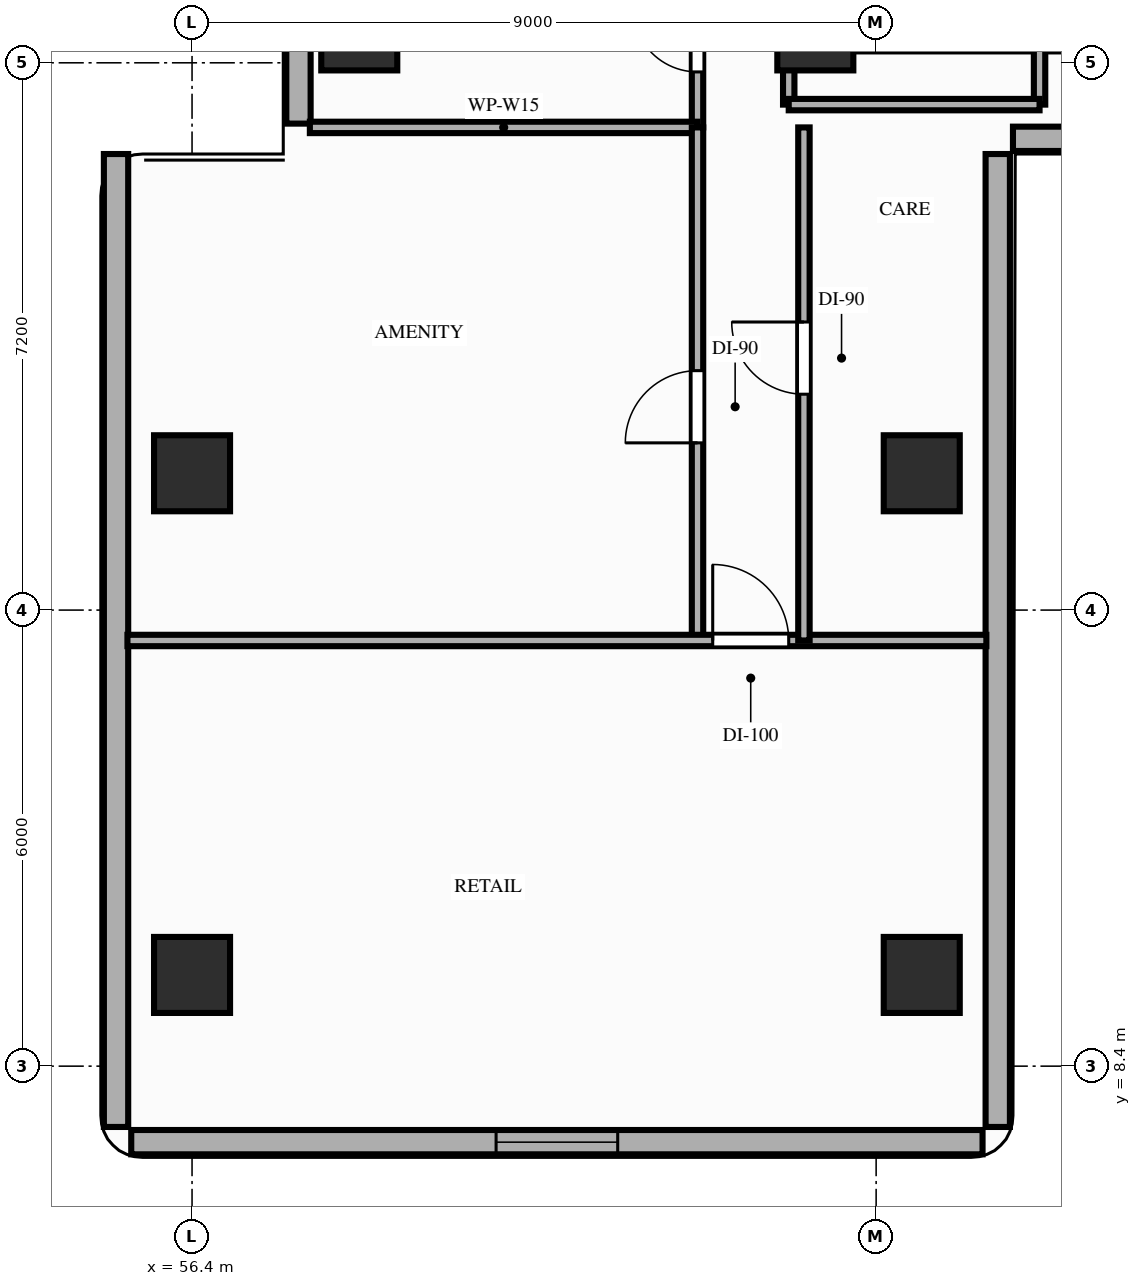
"""IFC4 building model, lengths in metres.
Left out: names, types, materials, properties, quantities, classifications, styles, units other than length and angle.
Written with IfcOpenShell. Run it as: python <this file> out.ifc"""

import sys

from ifc_helpers import new_model, si_unit, direction, frame, frame_2d, origin, origin_2d, place, context, subcontext, project, spatial, rectangle, extrude, element, fill, save


model = new_model("IFC4")
c1 = context("Model", 3, precision=1e-05, world=origin(), true_north=direction((0.0, 1.0)))
c2 = subcontext(c1, "Body", "Model", "MODEL_VIEW")
j1 = project(units=[si_unit("LENGTHUNIT", "METRE"), si_unit("PLANEANGLEUNIT", "RADIAN")], contexts=[c1])
p1 = place(None, origin())
s1 = spatial("IfcSite", under=j1, at=p1, CompositionType="ELEMENT")
p2 = place(p1, origin())
s2 = spatial("IfcBuilding", under=s1, at=p2, CompositionType="ELEMENT")
p3 = place(p2, frame((0.0, 0.0, 33.4)))
s3 = spatial("IfcBuildingStorey", under=s2, at=p3, CompositionType="ELEMENT", Elevation=33.4)
for number, where, z_axis, x_axis in (
    (1, (64.6, 22.0, 0.0), (0.0, 0.0, 1.0), (1.0, 0.0, 0.0)),
    (2, (58.6, 22.0, 0.0), (0.0, 0.0, 1.0), (1.0, 0.0, 0.0)),
    (3, (56.4, 9.6, 0.0), (0.0, 0.0, 1.0), (1.0, 0.0, 0.0)),
    (4, (56.4, 16.2, 0.0), (0.0, 0.0, 1.0), (1.0, 0.0, 0.0)),
    (5, (66.0, 9.6, 0.0), (0.0, 0.0, 1.0), (1.0, 0.0, 0.0)),
    (6, (66.0, 16.2, 0.0), (0.0, 0.0, 1.0), (1.0, 0.0, 0.0)),
):
    element("IfcColumn", number, at=place(p3, frame(where, z_axis=z_axis, x_axis=x_axis)), inside=s3, PredefinedType="COLUMN", context=c2, shape_type="SweptSolid", body=[
        extrude(rectangle(XDim=1.0, YDim=1.0, at=origin_2d()), origin(), (0.0, 0.0, 1.0), 3.2),
    ])
p4 = place(p3, frame((57.8, 43.4, 0.0), z_axis=(0.0, 0.0, 1.0), x_axis=(0.0, -1.0, 0.0)))
e7 = element("IfcWall", 7, at=p4, inside=s3, PredefinedType="STANDARD", context=c2, shape_type="SweptSolid", body=[
    extrude(rectangle(XDim=22.6, YDim=0.32, at=frame_2d((11.3, 0.0))), origin(), (0.0, 0.0, 1.0), 2.51),
])
p5 = place(p3, frame((55.6, 7.4, 0.0), z_axis=(0.0, 0.0, 1.0), x_axis=(1.0, 0.0, 0.0)))
e8 = element("IfcWall", 8, at=p5, inside=s3, PredefinedType="STANDARD", context=c2, shape_type="SweptSolid", body=[
    extrude(rectangle(XDim=11.2, YDim=0.32, at=frame_2d((5.6, 0.0))), origin(), (0.0, 0.0, 1.0), 3.02),
])
p6 = place(p5, frame((4.8, 0.0, 0.85)))
e9 = element("IfcOpeningElement", 9, at=p6, cuts=e8, PredefinedType="OPENING", context=c2, shape_type="SweptSolid", body=[
    extrude(rectangle(XDim=1.6, YDim=1.7, at=frame_2d((0.8, 0.85))), frame((0.0, 0.17, 0.0), z_axis=(0.0, -1.0, 0.0), x_axis=(1.0, 0.0, 0.0)), (0.0, 0.0, 1.0), 0.34),
])
for number, where, z_axis, x_axis in (
    (10, (55.4, 20.4, 0.0), (0.0, 0.0, 1.0), (0.0, -1.0, 0.0)),
    (11, (67.0, 7.6, 0.0), (0.0, 0.0, 1.0), (0.0, 1.0, 0.0)),
):
    element("IfcWall", number, at=place(p3, frame(where, z_axis=z_axis, x_axis=x_axis)), inside=s3, PredefinedType="STANDARD", context=c2, shape_type="SweptSolid", body=[
        extrude(rectangle(XDim=12.8, YDim=0.32, at=frame_2d((6.4, 0.0))), origin(), (0.0, 0.0, 1.0), 3.02),
    ])
p7 = place(p3, frame((67.2, 20.6, 0.0), z_axis=(0.0, 0.0, 1.0), x_axis=(1.0, 0.0, 0.0)))
e12 = element("IfcWall", 12, at=p7, inside=s3, PredefinedType="STANDARD", context=c2, shape_type="SweptSolid", body=[
    extrude(rectangle(XDim=5.6, YDim=0.32, at=frame_2d((2.8, 0.0))), origin(), (0.0, 0.0, 1.0), 3.02),
])
p8 = place(p3, frame((64.25, 21.05, 0.0), z_axis=(0.0, 0.0, 1.0), x_axis=(0.0, 1.0, 0.0)))
e13 = element("IfcWall", 13, at=p8, inside=s3, PredefinedType="PARTITIONING", context=c2, shape_type="SweptSolid", body=[
    extrude(rectangle(XDim=6.55, YDim=0.15, at=frame_2d((3.275, 0.0))), origin(), (0.0, 0.0, 1.0), 2.51),
])
p9 = place(p8, frame((3.1, 0.0, 0.0)))
e14 = element("IfcOpeningElement", 14, at=p9, cuts=e13, PredefinedType="OPENING", context=c2, shape_type="SweptSolid", body=[
    extrude(rectangle(XDim=0.95, YDim=2.15, at=frame_2d((0.475, 1.075))), frame((0.0, 0.085, 0.0), z_axis=(0.0, -1.0, 0.0), x_axis=(1.0, 0.0, 0.0)), (0.0, 0.0, 1.0), 0.17),
])
p10 = place(p3, frame((67.55, 21.05, 0.0), z_axis=(0.0, 0.0, 1.0), x_axis=(0.0, 1.0, 0.0)))
e15 = element("IfcWall", 15, at=p10, inside=s3, PredefinedType="PARTITIONING", context=c2, shape_type="SweptSolid", body=[
    extrude(rectangle(XDim=6.47, YDim=0.15, at=frame_2d((3.235, 0.0))), origin(), (0.0, 0.0, 1.0), 2.51),
])
p11 = place(p3, frame((64.25, 21.05, 0.0), z_axis=(0.0, 0.0, 1.0), x_axis=(1.0, 0.0, 0.0)))
e16 = element("IfcWall", 16, at=p11, inside=s3, PredefinedType="PARTITIONING", context=c2, shape_type="SweptSolid", body=[
    extrude(rectangle(XDim=3.3, YDim=0.15, at=frame_2d((1.65, 0.0))), origin(), (0.0, 0.0, 1.0), 2.51),
])
p12 = place(p3, frame((63.05, 20.75, 0.0), z_axis=(0.0, 0.0, 1.0), x_axis=(0.0, 1.0, 0.0)))
e17 = element("IfcWall", 17, at=p12, inside=s3, PredefinedType="PARTITIONING", context=c2, shape_type="SweptSolid", body=[
    extrude(rectangle(XDim=22.7, YDim=0.15, at=frame_2d((11.35, 0.0))), origin(), (0.0, 0.0, 1.0), 2.51),
])
p13 = place(p12, frame((0.73, 0.0, 0.0)))
e18 = element("IfcOpeningElement", 18, at=p13, cuts=e17, PredefinedType="OPENING", context=c2, shape_type="SweptSolid", body=[
    extrude(rectangle(XDim=0.85, YDim=2.1, at=frame_2d((0.425, 1.05))), frame((0.0, 0.085, 0.0), z_axis=(0.0, -1.0, 0.0), x_axis=(1.0, 0.0, 0.0)), (0.0, 0.0, 1.0), 0.17),
])
p14 = place(p12, frame((3.43, 0.0, 0.0)))
e19 = element("IfcOpeningElement", 19, at=p14, cuts=e17, PredefinedType="OPENING", context=c2, shape_type="SweptSolid", body=[
    extrude(rectangle(XDim=0.95, YDim=2.1, at=frame_2d((0.475, 1.05))), frame((0.0, 0.085, 0.0), z_axis=(0.0, -1.0, 0.0), x_axis=(1.0, 0.0, 0.0)), (0.0, 0.0, 1.0), 0.17),
])
p15 = place(p12, frame((8.15, 0.0, 0.0)))
e20 = element("IfcOpeningElement", 20, at=p15, cuts=e17, PredefinedType="OPENING", context=c2, shape_type="SweptSolid", body=[
    extrude(rectangle(XDim=0.95, YDim=2.15, at=frame_2d((0.475, 1.075))), frame((0.0, 0.085, 0.0), z_axis=(0.0, -1.0, 0.0), x_axis=(1.0, 0.0, 0.0)), (0.0, 0.0, 1.0), 0.17),
])
p16 = place(p12, frame((13.67, 0.0, 0.0)))
e21 = element("IfcOpeningElement", 21, at=p16, cuts=e17, PredefinedType="OPENING", context=c2, shape_type="SweptSolid", body=[
    extrude(rectangle(XDim=0.95, YDim=2.15, at=frame_2d((0.475, 1.075))), frame((0.0, 0.085, 0.0), z_axis=(0.0, -1.0, 0.0), x_axis=(1.0, 0.0, 0.0)), (0.0, 0.0, 1.0), 0.17),
])
p17 = place(p12, frame((19.47, 0.0, 0.0)))
e22 = element("IfcOpeningElement", 22, at=p17, cuts=e17, PredefinedType="OPENING", context=c2, shape_type="SweptSolid", body=[
    extrude(rectangle(XDim=0.95, YDim=2.15, at=frame_2d((0.475, 1.075))), frame((0.0, 0.085, 0.0), z_axis=(0.0, -1.0, 0.0), x_axis=(1.0, 0.0, 0.0)), (0.0, 0.0, 1.0), 0.17),
])
p18 = place(p3, frame((57.95, 20.75, 0.0), z_axis=(0.0, 0.0, 1.0), x_axis=(1.0, 0.0, 0.0)))
e23 = element("IfcWall", 23, at=p18, inside=s3, PredefinedType="PARTITIONING", context=c2, shape_type="SweptSolid", body=[
    extrude(rectangle(XDim=5.1, YDim=0.15, at=frame_2d((2.55, 0.0))), origin(), (0.0, 0.0, 1.0), 2.51),
])
p19 = place(p3, frame((63.05, 14.0, 0.0), z_axis=(0.0, 0.0, 1.0), x_axis=(0.0, 1.0, 0.0)))
e24 = element("IfcWall", 24, at=p19, inside=s3, PredefinedType="PARTITIONING", context=c2, shape_type="SweptSolid", body=[
    extrude(rectangle(XDim=6.75, YDim=0.15, at=frame_2d((3.375, 0.0))), origin(), (0.0, 0.0, 1.0), 2.51),
])
p20 = place(p19, frame((2.6, 0.0, 0.0)))
e25 = element("IfcOpeningElement", 25, at=p20, cuts=e24, PredefinedType="OPENING", context=c2, shape_type="SweptSolid", body=[
    extrude(rectangle(XDim=0.95, YDim=2.15, at=frame_2d((0.475, 1.075))), frame((0.0, 0.085, 0.0), z_axis=(0.0, -1.0, 0.0), x_axis=(1.0, 0.0, 0.0)), (0.0, 0.0, 1.0), 0.17),
])
p21 = place(p3, frame((55.55, 14.0, 0.0), z_axis=(0.0, 0.0, 1.0), x_axis=(1.0, 0.0, 0.0)))
e26 = element("IfcWall", 26, at=p21, inside=s3, PredefinedType="PARTITIONING", context=c2, shape_type="SweptSolid", body=[
    extrude(rectangle(XDim=11.3, YDim=0.15, at=frame_2d((5.65, 0.0))), origin(), (0.0, 0.0, 1.0), 2.51),
])
p22 = place(p21, frame((7.7, 0.0, 0.0)))
e27 = element("IfcOpeningElement", 27, at=p22, cuts=e26, PredefinedType="OPENING", context=c2, shape_type="SweptSolid", body=[
    extrude(rectangle(XDim=1.0, YDim=2.15, at=frame_2d((0.5, 1.075))), frame((0.0, 0.085, 0.0), z_axis=(0.0, -1.0, 0.0), x_axis=(1.0, 0.0, 0.0)), (0.0, 0.0, 1.0), 0.17),
])
p23 = place(p3, frame((64.45, 14.0, 0.0), z_axis=(0.0, 0.0, 1.0), x_axis=(0.0, 1.0, 0.0)))
e28 = element("IfcWall", 28, at=p23, inside=s3, PredefinedType="PARTITIONING", context=c2, shape_type="SweptSolid", body=[
    extrude(rectangle(XDim=6.75, YDim=0.15, at=frame_2d((3.375, 0.0))), origin(), (0.0, 0.0, 1.0), 2.51),
])
p24 = place(p23, frame((3.24, 0.0, 0.0)))
e29 = element("IfcOpeningElement", 29, at=p24, cuts=e28, PredefinedType="OPENING", context=c2, shape_type="SweptSolid", body=[
    extrude(rectangle(XDim=0.95, YDim=2.15, at=frame_2d((0.475, 1.075))), frame((0.0, 0.085, 0.0), z_axis=(0.0, -1.0, 0.0), x_axis=(1.0, 0.0, 0.0)), (0.0, 0.0, 1.0), 0.17),
])
p25 = place(p6, origin())
e30 = element("IfcWindow", 30, at=p25, inside=s3, PartitioningType="SINGLE_PANEL", PredefinedType="WINDOW", context=c2, shape_type="SweptSolid", body=[
    extrude(rectangle(XDim=1.6, YDim=1.7, at=frame_2d((0.8, 0.85))), frame((0.0, 0.03, 0.0), z_axis=(0.0, -1.0, 0.0), x_axis=(1.0, 0.0, 0.0)), (0.0, 0.0, 1.0), 0.06),
])
fill(e9, e30)
p26 = place(p13, origin())
e31 = element("IfcDoor", 31, at=p26, inside=s3, OperationType="SINGLE_SWING_RIGHT", PredefinedType="DOOR", context=c2, shape_type="SweptSolid", body=[
    extrude(rectangle(XDim=0.85, YDim=2.1, at=frame_2d((0.425, 1.05))), frame((0.0, 0.025, 0.0), z_axis=(0.0, -1.0, 0.0), x_axis=(1.0, 0.0, 0.0)), (0.0, 0.0, 1.0), 0.05),
])
fill(e18, e31)
p27 = place(p20, origin())
e32 = element("IfcDoor", 32, at=p27, inside=s3, OperationType="SINGLE_SWING_LEFT", PredefinedType="DOOR", context=c2, shape_type="SweptSolid", body=[
    extrude(rectangle(XDim=0.95, YDim=2.15, at=frame_2d((0.475, 1.075))), frame((0.0, 0.025, 0.0), z_axis=(0.0, -1.0, 0.0), x_axis=(1.0, 0.0, 0.0)), (0.0, 0.0, 1.0), 0.05),
])
fill(e25, e32)
p28 = place(p24, origin())
e33 = element("IfcDoor", 33, at=p28, inside=s3, OperationType="SINGLE_SWING_RIGHT", PredefinedType="DOOR", context=c2, shape_type="SweptSolid", body=[
    extrude(rectangle(XDim=0.95, YDim=2.15, at=frame_2d((0.475, 1.075))), frame((0.0, 0.025, 0.0), z_axis=(0.0, -1.0, 0.0), x_axis=(1.0, 0.0, 0.0)), (0.0, 0.0, 1.0), 0.05),
])
fill(e29, e33)
p29 = place(p22, origin())
e34 = element("IfcDoor", 34, at=p29, inside=s3, OperationType="SINGLE_SWING_LEFT", PredefinedType="DOOR", context=c2, shape_type="SweptSolid", body=[
    extrude(rectangle(XDim=1.0, YDim=2.15, at=frame_2d((0.5, 1.075))), frame((0.0, 0.025, 0.0), z_axis=(0.0, -1.0, 0.0), x_axis=(1.0, 0.0, 0.0)), (0.0, 0.0, 1.0), 0.05),
])
fill(e27, e34)
save(model, sys.argv[1])
